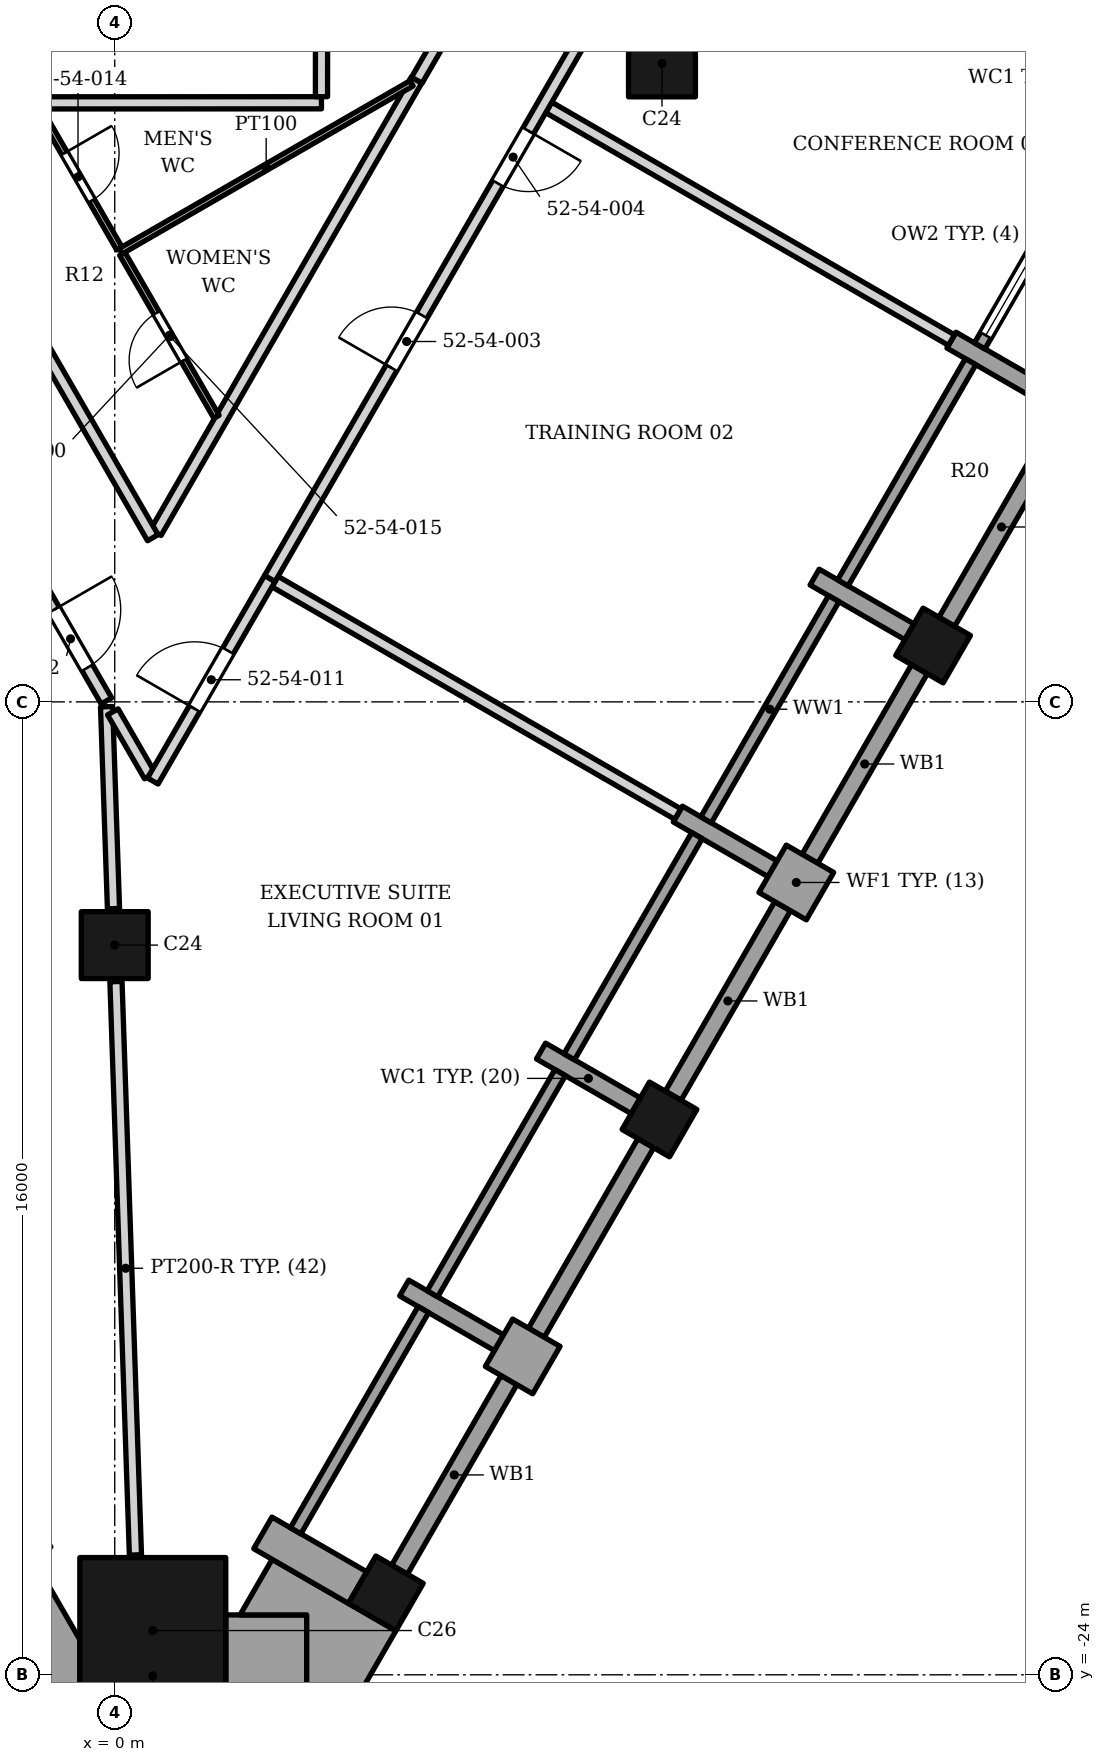
"""IFC4 building model, lengths in metres.
Left out: names, types, materials, properties, quantities, classifications, styles, units other than length and angle.
Written with IfcOpenShell. Run it as: python <this file> out.ifc"""

import sys

from ifc_helpers import new_model, si_unit, direction, frame, frame_2d, origin, origin_2d, place, context, subcontext, project, spatial, polyline, rectangle, outline, extrude, element, fill, save


model = new_model("IFC4")
c1 = context("Model", 3, precision=1e-05, world=origin(), true_north=direction((0.0, 1.0)))
c2 = subcontext(c1, "Body", "Model", "MODEL_VIEW")
j1 = project(units=[si_unit("LENGTHUNIT", "METRE"), si_unit("PLANEANGLEUNIT", "RADIAN")], contexts=[c1])
p1 = place(None, origin())
s1 = spatial("IfcSite", under=j1, at=p1, CompositionType="ELEMENT")
p2 = place(p1, origin())
s2 = spatial("IfcBuilding", under=s1, at=p2, CompositionType="ELEMENT")
p3 = place(p2, frame((0.0, 0.0, 219.8)))
s3 = spatial("IfcBuildingStorey", under=s2, at=p3, CompositionType="ELEMENT", Elevation=219.8)
p4 = place(p3, frame((0.626, -23.272, 0.0), z_axis=(0.0, 0.0, 1.0), x_axis=(0.0, 1.0, 0.0)))
e1 = element("IfcColumn", 1, at=p4, inside=s3, PredefinedType="COLUMN", context=c2, shape_type="SweptSolid", body=[
    extrude(rectangle(XDim=2.4, YDim=2.4, at=origin_2d()), origin(), (0.0, 0.0, 1.0), 3.9),
])
for number, where, z_axis, x_axis in (
    (2, (9.0, 2.5, 0.0), (0.0, 0.0, 1.0), (1.0, 0.0, 0.0)),
    (3, (0.0, -12.0, 0.0), (0.0, 0.0, 1.0), (1.0, 0.0, 0.0)),
):
    element("IfcColumn", number, at=place(p3, frame(where, z_axis=z_axis, x_axis=x_axis)), inside=s3, PredefinedType="COLUMN", context=c2, shape_type="SweptSolid", body=[
        extrude(rectangle(XDim=1.1, YDim=1.1, at=origin_2d()), origin(), (0.0, 0.0, 1.0), 3.9),
    ])
for number, where, z_axis, x_axis in (
    (4, (4.459, -22.661, 0.0), (0.0, 0.0, 1.0), (0.5, 0.866, 0.0)),
    (5, (8.959, -14.867, 0.0), (0.0, 0.0, 1.0), (0.5, 0.866, 0.0)),
    (6, (13.459, -7.073, 0.0), (0.0, 0.0, 1.0), (0.5, 0.866, 0.0)),
):
    element("IfcColumn", number, at=place(p3, frame(where, z_axis=z_axis, x_axis=x_axis)), inside=s3, PredefinedType="COLUMN", context=c2, shape_type="SweptSolid", body=[
        extrude(rectangle(XDim=0.9, YDim=0.9, at=origin_2d()), origin(), (0.0, 0.0, 1.0), 3.9),
    ])
p5 = place(p3, frame((2.436, -21.666, 0.0), z_axis=(0.0, 0.0, 1.0), x_axis=(0.866013897511, -0.50001992892, 0.0)))
e7 = element("IfcWall", 7, at=p5, inside=s3, PredefinedType="SOLIDWALL", context=c2, shape_type="SweptSolid", body=[
    extrude(rectangle(XDim=1.8, YDim=0.6, at=frame_2d((0.9, 0.0))), origin(), (0.0, 0.0, 1.0), 3.0),
])
p6 = place(p3, frame((6.484, -19.154, 0.0), z_axis=(0.0, 0.0, 1.0), x_axis=(0.499902469156, 0.866081705922, 0.0)))
e8 = element("IfcWall", 8, at=p6, inside=s3, PredefinedType="SOLIDWALL", context=c2, shape_type="SweptSolid", body=[
    extrude(rectangle(XDim=0.9, YDim=0.9, at=frame_2d((0.45, 0.0))), origin(), (0.0, 0.0, 1.0), 3.0),
])
p7 = place(p3, frame((6.32, -18.539, 0.0), z_axis=(0.0, 0.0, 1.0), x_axis=(-0.865989075817, 0.500062916607, 0.0)))
e9 = element("IfcWall", 9, at=p7, inside=s3, PredefinedType="SOLIDWALL", context=c2, shape_type="SweptSolid", body=[
    extrude(rectangle(XDim=1.8, YDim=0.3, at=frame_2d((0.9, 0.0))), origin(), (0.0, 0.0, 1.0), 3.0),
])
p8 = place(p3, frame((8.569, -14.642, 0.0), z_axis=(0.0, 0.0, 1.0), x_axis=(-0.866013897511, 0.50001992892, 0.0)))
e10 = element("IfcWall", 10, at=p8, inside=s3, PredefinedType="SOLIDWALL", context=c2, shape_type="SweptSolid", body=[
    extrude(rectangle(XDim=1.8, YDim=0.3, at=frame_2d((0.9, 0.0))), origin(), (0.0, 0.0, 1.0), 3.0),
])
p9 = place(p3, frame((11.434, -10.58, 0.0), z_axis=(0.0, 0.0, 1.0), x_axis=(-0.499902469156, -0.866081705922, 0.0)))
e11 = element("IfcWall", 11, at=p9, inside=s3, PredefinedType="SOLIDWALL", context=c2, shape_type="SweptSolid", body=[
    extrude(rectangle(XDim=0.9, YDim=0.9, at=frame_2d((0.45, 0.0))), origin(), (0.0, 0.0, 1.0), 3.0),
])
for number, where, z_axis, x_axis in (
    (12, (10.82, -10.745, 0.0), (0.0, 0.0, 1.0), (-0.866, 0.5, 0.0)),
    (13, (13.07, -6.848, 0.0), (0.0, 0.0, 1.0), (-0.866, 0.5, 0.0)),
    (14, (15.32, -2.95, 0.0), (0.0, 0.0, 1.0), (-0.866, 0.5, 0.0)),
):
    element("IfcWall", number, at=place(p3, frame(where, z_axis=z_axis, x_axis=x_axis)), inside=s3, PredefinedType="SOLIDWALL", context=c2, shape_type="SweptSolid", body=[
        extrude(rectangle(XDim=1.8, YDim=0.3, at=frame_2d((0.9, 0.0))), origin(), (0.0, 0.0, 1.0), 3.0),
    ])
p10 = place(p3, frame((4.684, -22.271, 0.0), z_axis=(0.0, 0.0, 1.0), x_axis=(0.500012057535, 0.866018442252, 0.0)))
e15 = element("IfcWall", 15, at=p10, inside=s3, PredefinedType="SOLIDWALL", context=c2, shape_type="SweptSolid", body=[
    extrude(rectangle(XDim=3.6, YDim=0.3, at=frame_2d((1.8, 0.0))), origin(), (0.0, 0.0, 1.0), 3.0),
])
p11 = place(p3, frame((2.975, -21.631, 0.0), z_axis=(0.0, 0.0, 1.0), x_axis=(0.500002543286, 0.866023935413, 0.0)))
e16 = element("IfcWall", 16, at=p11, inside=s3, PredefinedType="ELEMENTEDWALL", context=c2, shape_type="SweptSolid", body=[
    extrude(rectangle(XDim=4.2, YDim=0.2, at=frame_2d((2.1, 0.0))), origin(), (0.0, 0.0, 1.0), 3.0),
])
p12 = place(p3, frame((6.934, -18.374, 0.0), z_axis=(0.0, 0.0, 1.0), x_axis=(0.500012057535, 0.866018442252, 0.0)))
e17 = element("IfcWall", 17, at=p12, inside=s3, PredefinedType="SOLIDWALL", context=c2, shape_type="SweptSolid", body=[
    extrude(rectangle(XDim=3.6, YDim=0.3, at=frame_2d((1.8, 0.0))), origin(), (0.0, 0.0, 1.0), 3.0),
])
p13 = place(p3, frame((5.225, -17.734, 0.0), z_axis=(0.0, 0.0, 1.0), x_axis=(0.500027713859, 0.866009402589, 0.0)))
e18 = element("IfcWall", 18, at=p13, inside=s3, PredefinedType="ELEMENTEDWALL", context=c2, shape_type="SweptSolid", body=[
    extrude(rectangle(XDim=4.2, YDim=0.2, at=frame_2d((2.1, 0.0))), origin(), (0.0, 0.0, 1.0), 3.0),
])
p14 = place(p3, frame((9.184, -14.477, 0.0), z_axis=(0.0, 0.0, 1.0), x_axis=(0.500012057535, 0.866018442252, 0.0)))
e19 = element("IfcWall", 19, at=p14, inside=s3, PredefinedType="SOLIDWALL", context=c2, shape_type="SweptSolid", body=[
    extrude(rectangle(XDim=3.6, YDim=0.3, at=frame_2d((1.8, 0.0))), origin(), (0.0, 0.0, 1.0), 2.95),
])
p15 = place(p3, frame((7.475, -13.837, 0.0), z_axis=(0.0, 0.0, 1.0), x_axis=(0.500027713859, 0.866009402589, 0.0)))
e20 = element("IfcWall", 20, at=p15, inside=s3, PredefinedType="ELEMENTEDWALL", context=c2, shape_type="SweptSolid", body=[
    extrude(rectangle(XDim=4.2, YDim=0.2, at=frame_2d((2.1, 0.0))), origin(), (0.0, 0.0, 1.0), 2.95),
])
p16 = place(p3, frame((11.434, -10.58, 0.0), z_axis=(0.0, 0.0, 1.0), x_axis=(0.499990559667, 0.866030854095, 0.0)))
e21 = element("IfcWall", 21, at=p16, inside=s3, PredefinedType="SOLIDWALL", context=c2, shape_type="SweptSolid", body=[
    extrude(rectangle(XDim=3.6, YDim=0.3, at=frame_2d((1.8, 0.0))), origin(), (0.0, 0.0, 1.0), 3.0),
])
p17 = place(p3, frame((9.725, -9.94, 0.0), z_axis=(0.0, 0.0, 1.0), x_axis=(0.500002543286, 0.866023935413, 0.0)))
e22 = element("IfcWall", 22, at=p17, inside=s3, PredefinedType="ELEMENTEDWALL", context=c2, shape_type="SweptSolid", body=[
    extrude(rectangle(XDim=4.2, YDim=0.2, at=frame_2d((2.1, 0.0))), origin(), (0.0, 0.0, 1.0), 3.0),
])
p18 = place(p3, frame((13.684, -6.683, 0.0), z_axis=(0.0, 0.0, 1.0), x_axis=(0.500012057535, 0.866018442252, 0.0)))
e23 = element("IfcWall", 23, at=p18, inside=s3, PredefinedType="SOLIDWALL", context=c2, shape_type="SweptSolid", body=[
    extrude(rectangle(XDim=3.6, YDim=0.3, at=frame_2d((1.8, 0.0))), origin(), (0.0, 0.0, 1.0), 3.0),
])
p19 = place(p3, frame((11.975, -6.043, 0.0), z_axis=(0.0, 0.0, 1.0), x_axis=(0.500027713859, 0.866009402589, 0.0)))
e24 = element("IfcWall", 24, at=p19, inside=s3, PredefinedType="ELEMENTEDWALL", context=c2, shape_type="SweptSolid", body=[
    extrude(rectangle(XDim=4.2, YDim=0.2, at=frame_2d((2.1, 0.0))), origin(), (0.0, 0.0, 1.0), 3.0),
])
p20 = place(p3, frame((14.225, -2.146, 0.0), z_axis=(0.0, 0.0, 1.0), x_axis=(0.500002543286, 0.866023935413, 0.0)))
e25 = element("IfcWall", 25, at=p20, inside=s3, PredefinedType="ELEMENTEDWALL", context=c2, shape_type="SweptSolid", body=[
    extrude(rectangle(XDim=4.2, YDim=0.2, at=frame_2d((2.1, 0.0))), origin(), (0.0, 0.0, 1.0), 3.0),
])
p21 = place(p20, frame((0.2, 0.0, 0.45)))
e26 = element("IfcOpeningElement", 26, at=p21, cuts=e25, PredefinedType="OPENING", context=c2, shape_type="SweptSolid", body=[
    extrude(rectangle(XDim=3.8, YDim=2.25, at=frame_2d((1.9, 1.125))), frame((0.0, 0.11, 0.0), z_axis=(0.0, -1.0, 0.0), x_axis=(1.0, 0.0, 0.0)), (0.0, 0.0, 1.0), 0.22),
])
p22 = place(p3, origin())
e27 = element("IfcWall", 27, at=p22, inside=s3, PredefinedType="SOLIDWALL", context=c2, shape_type="SweptSolid", body=[
    extrude(outline(polyline([(-0.574, -23.423), (-1.353, -22.073), (-3.388, -23.248), (-2.296, -25.14), (-0.574, -24.146), (-0.574, -23.423)])), origin(), (0.0, 0.0, 1.0), 3.0),
])
p23 = place(p3, origin())
e28 = element("IfcWall", 28, at=p23, inside=s3, PredefinedType="SOLIDWALL", context=c2, shape_type="SweptSolid", body=[
    extrude(outline(polyline([(1.826, -24.472), (-0.574, -24.472), (-0.574, -24.146), (-1.906, -24.915), (-1.906, -25.365), (3.158, -25.365), (3.158, -23.015), (1.826, -23.015), (1.826, -24.472)])), origin(), (0.0, 0.0, 1.0), 3.0),
])
p24 = place(p3, origin())
e29 = element("IfcWall", 29, at=p24, inside=s3, PredefinedType="SOLIDWALL", context=c2, shape_type="SweptSolid", body=[
    extrude(outline(polyline([(4.624, -23.276), (2.589, -22.101), (2.061, -23.015), (3.158, -23.015), (3.158, -24.915), (3.548, -25.14), (4.624, -23.276)])), origin(), (0.0, 0.0, 1.0), 3.0),
])
p25 = place(p3, frame((0.02, -12.6, 0.0), z_axis=(0.0, 0.0, 1.0), x_axis=(0.033928355038, -0.999424267628, 0.0)))
e30 = element("IfcWall", 30, at=p25, inside=s3, PredefinedType="PARTITIONING", context=c2, shape_type="SweptSolid", body=[
    extrude(rectangle(XDim=9.434, YDim=0.2, at=frame_2d((4.717, 0.0))), origin(), (0.0, 0.0, 1.0), 3.202),
])
p26 = place(p3, frame((-0.134, -8.08, 0.0), z_axis=(0.0, 0.0, 1.0), x_axis=(0.034171208609, -0.999415993719, 0.0)))
e31 = element("IfcWall", 31, at=p26, inside=s3, PredefinedType="PARTITIONING", context=c2, shape_type="SweptSolid", body=[
    extrude(rectangle(XDim=3.322, YDim=0.2, at=frame_2d((1.661, 0.0))), origin(), (0.0, 0.0, 1.0), 2.884),
])
p27 = place(p3, frame((2.635, -6.022, 0.0), z_axis=(0.0, 0.0, 1.0), x_axis=(0.866123944565, -0.499829283508, 0.0)))
e32 = element("IfcWall", 32, at=p27, inside=s3, PredefinedType="PARTITIONING", context=c2, shape_type="SweptSolid", body=[
    extrude(rectangle(XDim=7.65, YDim=0.2, at=frame_2d((3.825, 0.0))), origin(), (0.0, 0.0, 1.0), 2.884),
])
p28 = place(p3, frame((-0.031, -8.164, 0.0), z_axis=(0.0, 0.0, 1.0), x_axis=(0.500314465278, -0.865843771031, 0.0)))
e33 = element("IfcWall", 33, at=p28, inside=s3, PredefinedType="PARTITIONING", context=c2, shape_type="SweptSolid", body=[
    extrude(rectangle(XDim=1.214, YDim=0.2, at=frame_2d((0.607, 0.0))), origin(), (0.0, 0.0, 1.0), 2.884),
])
p29 = place(p3, frame((-5.815, 1.851, 0.0), z_axis=(0.0, 0.0, 1.0), x_axis=(0.499991042018, -0.866030575616, 0.0)))
e34 = element("IfcWall", 34, at=p29, inside=s3, PredefinedType="PARTITIONING", context=c2, shape_type="SweptSolid", body=[
    extrude(rectangle(XDim=11.357, YDim=0.2, at=frame_2d((5.678, 0.0))), origin(), (0.0, 0.0, 1.0), 2.884),
])
p30 = place(p29, frame((4.0, 0.0, 0.0)))
e35 = element("IfcOpeningElement", 35, at=p30, cuts=e34, PredefinedType="OPENING", context=c2, shape_type="SweptSolid", body=[
    extrude(rectangle(XDim=1.0, YDim=2.1, at=frame_2d((0.5, 1.05))), frame((0.0, 0.11, 0.0), z_axis=(0.0, -1.0, 0.0), x_axis=(1.0, 0.0, 0.0)), (0.0, 0.0, 1.0), 0.22),
])
p31 = place(p29, frame((7.501, 0.0, 0.0)))
e36 = element("IfcOpeningElement", 36, at=p31, cuts=e34, PredefinedType="OPENING", context=c2, shape_type="SweptSolid", body=[
    extrude(rectangle(XDim=1.0, YDim=2.1, at=frame_2d((0.5, 1.05))), frame((0.0, 0.11, 0.0), z_axis=(0.0, -1.0, 0.0), x_axis=(1.0, 0.0, 0.0)), (0.0, 0.0, 1.0), 0.22),
])
p32 = place(p29, frame((9.627, 0.0, 0.0)))
e37 = element("IfcOpeningElement", 37, at=p32, cuts=e34, PredefinedType="OPENING", context=c2, shape_type="SweptSolid", body=[
    extrude(rectangle(XDim=1.1, YDim=2.1, at=frame_2d((0.55, 1.05))), frame((0.0, 0.11, 0.0), z_axis=(0.0, -1.0, 0.0), x_axis=(1.0, 0.0, 0.0)), (0.0, 0.0, 1.0), 0.22),
])
p33 = place(p3, frame((0.626, -9.301, 0.0), z_axis=(0.0, 0.0, 1.0), x_axis=(0.500330475361, 0.865834519655, 0.0)))
e38 = element("IfcWall", 38, at=p33, inside=s3, PredefinedType="PARTITIONING", context=c2, shape_type="SweptSolid", body=[
    extrude(rectangle(XDim=3.846, YDim=0.2, at=frame_2d((1.923, 0.0))), origin(), (0.0, 0.0, 1.0), 3.73),
])
p34 = place(p33, frame((1.373, 0.0, 0.0)))
e39 = element("IfcOpeningElement", 39, at=p34, cuts=e38, PredefinedType="OPENING", context=c2, shape_type="SweptSolid", body=[
    extrude(rectangle(XDim=1.1, YDim=2.1, at=frame_2d((0.55, 1.05))), frame((0.0, 0.11, 0.0), z_axis=(0.0, -1.0, 0.0), x_axis=(1.0, 0.0, 0.0)), (0.0, 0.0, 1.0), 0.22),
])
p35 = place(p3, frame((0.676, -5.214, 0.0), z_axis=(0.0, 0.0, 1.0), x_axis=(0.499295729612, 0.866431632843, 0.0)))
e40 = element("IfcWall", 40, at=p35, inside=s3, PredefinedType="PARTITIONING", context=c2, shape_type="SweptSolid", body=[
    extrude(rectangle(XDim=8.586, YDim=0.2, at=frame_2d((4.293, 0.0))), origin(), (0.0, 0.0, 1.0), 2.884),
])
p36 = place(p3, frame((0.124, -0.631, 0.0), z_axis=(0.0, 0.0, 1.0), x_axis=(0.500479866737, -0.865748175274, 0.0)))
e41 = element("IfcWall", 41, at=p36, inside=s3, PredefinedType="PARTITIONING", context=c2, shape_type="SweptSolid", body=[
    extrude(rectangle(XDim=3.097, YDim=0.1, at=frame_2d((1.548, 0.0))), origin(), (0.0, 0.0, 1.0), 2.884),
])
p37 = place(p36, frame((1.124, 0.0, 0.0)))
e42 = element("IfcOpeningElement", 42, at=p37, cuts=e41, PredefinedType="OPENING", context=c2, shape_type="SweptSolid", body=[
    extrude(rectangle(XDim=0.9, YDim=2.1, at=frame_2d((0.45, 1.05))), frame((0.0, 0.06, 0.0), z_axis=(0.0, -1.0, 0.0), x_axis=(1.0, 0.0, 0.0)), (0.0, 0.0, 1.0), 0.12),
])
p38 = place(p3, frame((-1.258, 1.766, 0.0), z_axis=(0.0, 0.0, 1.0), x_axis=(0.50002892151, -0.866008705299, 0.0)))
e43 = element("IfcWall", 43, at=p38, inside=s3, PredefinedType="PARTITIONING", context=c2, shape_type="SweptSolid", body=[
    extrude(rectangle(XDim=2.666, YDim=0.1, at=frame_2d((1.333, 0.0))), origin(), (0.0, 0.0, 1.0), 2.884),
])
p39 = place(p38, frame((0.858, 0.0, 0.0)))
e44 = element("IfcOpeningElement", 44, at=p39, cuts=e43, PredefinedType="OPENING", context=c2, shape_type="SweptSolid", body=[
    extrude(rectangle(XDim=0.9, YDim=2.1, at=frame_2d((0.45, 1.05))), frame((0.0, 0.06, 0.0), z_axis=(0.0, -1.0, 0.0), x_axis=(1.0, 0.0, 0.0)), (0.0, 0.0, 1.0), 0.12),
])
p40 = place(p3, frame((7.137, 1.776, 0.0), z_axis=(0.0, 0.0, 1.0), x_axis=(0.865929891815, -0.500165395106, 0.0)))
e45 = element("IfcWall", 45, at=p40, inside=s3, PredefinedType="PARTITIONING", context=c2, shape_type="SweptSolid", body=[
    extrude(rectangle(XDim=7.649, YDim=0.2, at=frame_2d((3.825, 0.0))), origin(), (0.0, 0.0, 1.0), 3.052),
])
p41 = place(p3, frame((-1.309, 1.851, 0.0), z_axis=(0.0, 0.0, 1.0), x_axis=(0.999999934138, 0.000362938743, 0.0)))
e46 = element("IfcWall", 46, at=p41, inside=s3, PredefinedType="PARTITIONING", context=c2, shape_type="SweptSolid", body=[
    extrude(rectangle(XDim=4.709, YDim=0.2, at=frame_2d((2.354, 0.0))), origin(), (0.0, 0.0, 1.0), 3.73),
])
p42 = place(p3, frame((0.099, -0.588, 0.0), z_axis=(0.0, 0.0, 1.0), x_axis=(0.866176017048, 0.49973903939, 0.0)))
e47 = element("IfcWall", 47, at=p42, inside=s3, PredefinedType="PARTITIONING", context=c2, shape_type="SweptSolid", body=[
    extrude(rectangle(XDim=5.522, YDim=0.1, at=frame_2d((2.761, 0.0))), origin(), (0.0, 0.0, 1.0), 2.884),
])
p43 = place(p3, frame((4.968, 2.223, 0.0), z_axis=(0.0, 0.0, 1.0), x_axis=(0.500876298319, 0.865518881239, 0.0)))
e48 = element("IfcWall", 48, at=p43, inside=s3, PredefinedType="PARTITIONING", context=c2, shape_type="SweptSolid", body=[
    extrude(rectangle(XDim=1.685, YDim=0.2, at=frame_2d((0.842, 0.0))), origin(), (0.0, 0.0, 1.0), 3.73),
])
p44 = place(p3, frame((2.551, -5.971, 0.0), z_axis=(0.0, 0.0, 1.0), x_axis=(0.500007765274, 0.866020920455, 0.0)))
e49 = element("IfcWall", 49, at=p44, inside=s3, PredefinedType="PARTITIONING", context=c2, shape_type="SweptSolid", body=[
    extrude(rectangle(XDim=11.111, YDim=0.2, at=frame_2d((5.555, 0.0))), origin(), (0.0, 0.0, 1.0), 2.884),
])
p45 = place(p44, frame((4.0, 0.0, 0.0)))
e50 = element("IfcOpeningElement", 50, at=p45, cuts=e49, PredefinedType="OPENING", context=c2, shape_type="SweptSolid", body=[
    extrude(rectangle(XDim=1.0, YDim=2.1, at=frame_2d((0.5, 1.05))), frame((0.0, 0.11, 0.0), z_axis=(0.0, -1.0, 0.0), x_axis=(1.0, 0.0, 0.0)), (0.0, 0.0, 1.0), 0.22),
])
p46 = place(p44, frame((7.502, 0.0, 0.0)))
e51 = element("IfcOpeningElement", 51, at=p46, cuts=e49, PredefinedType="OPENING", context=c2, shape_type="SweptSolid", body=[
    extrude(rectangle(XDim=1.0, YDim=2.1, at=frame_2d((0.5, 1.05))), frame((0.0, 0.11, 0.0), z_axis=(0.0, -1.0, 0.0), x_axis=(1.0, 0.0, 0.0)), (0.0, 0.0, 1.0), 0.22),
])
p47 = place(p3, frame((-4.658, 3.852, 0.0), z_axis=(0.0, 0.0, 1.0), x_axis=(0.500012400782, -0.866018244071, 0.0)))
e52 = element("IfcWall", 52, at=p47, inside=s3, PredefinedType="PARTITIONING", context=c2, shape_type="SweptSolid", body=[
    extrude(rectangle(XDim=10.569, YDim=0.2, at=frame_2d((5.284, 0.0))), origin(), (0.0, 0.0, 1.0), 2.884),
])
p48 = place(p47, frame((4.784, 0.0, 0.0)))
e53 = element("IfcOpeningElement", 53, at=p48, cuts=e52, PredefinedType="OPENING", context=c2, shape_type="SweptSolid", body=[
    extrude(rectangle(XDim=1.0, YDim=2.1, at=frame_2d((0.5, 1.05))), frame((0.0, 0.11, 0.0), z_axis=(0.0, -1.0, 0.0), x_axis=(1.0, 0.0, 0.0)), (0.0, 0.0, 1.0), 0.22),
])
p49 = place(p3, frame((3.4, 1.952, 0.0), z_axis=(0.0, 0.0, 1.0), x_axis=(0.001028938362, 0.999999470643, 0.0)))
e54 = element("IfcWall", 54, at=p49, inside=s3, PredefinedType="PARTITIONING", context=c2, shape_type="SweptSolid", body=[
    extrude(rectangle(XDim=1.898, YDim=0.2, at=frame_2d((0.949, 0.0))), origin(), (0.0, 0.0, 1.0), 3.73),
])
p50 = place(p21, origin())
e55 = element("IfcWindow", 55, at=p50, inside=s3, PartitioningType="SINGLE_PANEL", PredefinedType="WINDOW", context=c2, shape_type="SweptSolid", body=[
    extrude(rectangle(XDim=3.8, YDim=2.25, at=frame_2d((1.9, 1.125))), frame((0.0, 0.03, 0.0), z_axis=(0.0, -1.0, 0.0), x_axis=(1.0, 0.0, 0.0)), (0.0, 0.0, 1.0), 0.06),
])
fill(e26, e55)
p51 = place(p45, origin())
e56 = element("IfcDoor", 56, at=p51, inside=s3, OperationType="SINGLE_SWING_LEFT", PredefinedType="DOOR", context=c2, shape_type="SweptSolid", body=[
    extrude(rectangle(XDim=1.0, YDim=2.1, at=frame_2d((0.5, 1.05))), frame((0.0, 0.025, 0.0), z_axis=(0.0, -1.0, 0.0), x_axis=(1.0, 0.0, 0.0)), (0.0, 0.0, 1.0), 0.05),
])
fill(e50, e56)
p52 = place(p46, origin())
e57 = element("IfcDoor", 57, at=p52, inside=s3, OperationType="SINGLE_SWING_RIGHT", PredefinedType="DOOR", context=c2, shape_type="SweptSolid", body=[
    extrude(rectangle(XDim=1.0, YDim=2.1, at=frame_2d((0.5, 1.05))), frame((0.0, 0.025, 0.0), z_axis=(0.0, -1.0, 0.0), x_axis=(1.0, 0.0, 0.0)), (0.0, 0.0, 1.0), 0.05),
])
fill(e51, e57)
p53 = place(p34, origin())
e58 = element("IfcDoor", 58, at=p53, inside=s3, OperationType="SINGLE_SWING_LEFT", PredefinedType="DOOR", context=c2, shape_type="SweptSolid", body=[
    extrude(rectangle(XDim=1.1, YDim=2.1, at=frame_2d((0.55, 1.05))), frame((0.0, 0.025, 0.0), z_axis=(0.0, -1.0, 0.0), x_axis=(1.0, 0.0, 0.0)), (0.0, 0.0, 1.0), 0.05),
])
fill(e39, e58)
p54 = place(p32, origin())
e59 = element("IfcDoor", 59, at=p54, inside=s3, OperationType="SINGLE_SWING_LEFT", PredefinedType="DOOR", context=c2, shape_type="SweptSolid", body=[
    extrude(rectangle(XDim=1.1, YDim=2.1, at=frame_2d((0.55, 1.05))), frame((0.0, 0.025, 0.0), z_axis=(0.0, -1.0, 0.0), x_axis=(1.0, 0.0, 0.0)), (0.0, 0.0, 1.0), 0.05),
])
fill(e37, e59)
p55 = place(p39, origin())
e60 = element("IfcDoor", 60, at=p55, inside=s3, OperationType="SINGLE_SWING_LEFT", PredefinedType="DOOR", context=c2, shape_type="SweptSolid", body=[
    extrude(rectangle(XDim=0.9, YDim=2.1, at=frame_2d((0.45, 1.05))), frame((0.0, 0.025, 0.0), z_axis=(0.0, -1.0, 0.0), x_axis=(1.0, 0.0, 0.0)), (0.0, 0.0, 1.0), 0.05),
])
fill(e44, e60)
p56 = place(p37, origin())
e61 = element("IfcDoor", 61, at=p56, inside=s3, OperationType="SINGLE_SWING_RIGHT", PredefinedType="DOOR", context=c2, shape_type="SweptSolid", body=[
    extrude(rectangle(XDim=0.9, YDim=2.1, at=frame_2d((0.45, 1.05))), frame((0.0, 0.025, 0.0), z_axis=(0.0, -1.0, 0.0), x_axis=(1.0, 0.0, 0.0)), (0.0, 0.0, 1.0), 0.05),
])
fill(e42, e61)
save(model, sys.argv[1])
